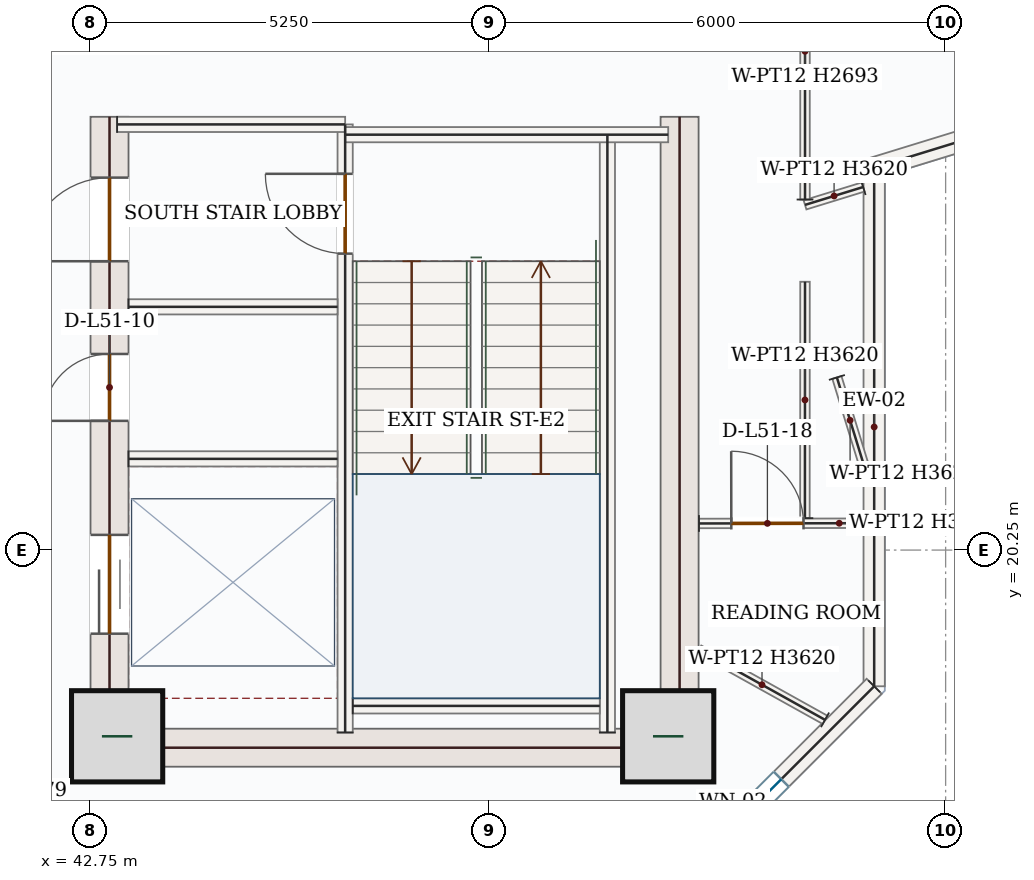
"""IFC4 building model, lengths in metres.
Left out: names, types, materials, properties, quantities, classifications, styles, units other than length and angle.
Written with IfcOpenShell. Run it as: python <this file> out.ifc"""

import sys

from ifc_helpers import new_model, si_unit, direction, frame, frame_2d, origin, origin_2d, place, context, subcontext, project, spatial, rectangle, extrude, source, transform, mapped, element, fill, save


model = new_model("IFC4")
c1 = context("Model", 3, precision=1e-05, world=origin(), true_north=direction((0.0, 1.0)))
c2 = subcontext(c1, "Body", "Model", "MODEL_VIEW")
j1 = project(units=[si_unit("LENGTHUNIT", "METRE"), si_unit("PLANEANGLEUNIT", "RADIAN")], contexts=[c1])
p1 = place(None, origin())
s1 = spatial("IfcSite", under=j1, at=p1, CompositionType="ELEMENT")
p2 = place(p1, origin())
s2 = spatial("IfcBuilding", under=s1, at=p2, CompositionType="ELEMENT")
p3 = place(p2, frame((0.0, 0.0, 217.5)))
s3 = spatial("IfcBuildingStorey", under=s2, at=p3, CompositionType="ELEMENT", Elevation=217.5)
p4 = place(p3, frame((43.0, 17.4, 0.0), z_axis=(0.0, 0.0, 1.0), x_axis=(0.0, 1.0, 0.0)))
e1 = element("IfcWall", 1, at=p4, inside=s3, PredefinedType="SHEAR", context=c2, shape_type="SweptSolid", body=[
    extrude(rectangle(XDim=8.55, YDim=0.5, at=frame_2d((4.275, 0.0))), origin(), (0.0, 0.0, 1.0), 3.62),
])
p5 = place(p4, frame((6.65, 0.0, 0.0)))
e2 = element("IfcOpeningElement", 2, at=p5, cuts=e1, PredefinedType="OPENING", context=c2, shape_type="SweptSolid", body=[
    extrude(rectangle(XDim=1.1, YDim=2.2, at=frame_2d((0.55, 1.1))), frame((0.0, 0.26, 0.0), z_axis=(0.0, -1.0, 0.0), x_axis=(1.0, 0.0, 0.0)), (0.0, 0.0, 1.0), 0.52),
])
p6 = place(p4, frame((1.75, 0.0, 0.0)))
e3 = element("IfcOpeningElement", 3, at=p6, cuts=e1, PredefinedType="OPENING", context=c2, shape_type="SweptSolid", body=[
    extrude(rectangle(XDim=1.3, YDim=2.2, at=frame_2d((0.65, 1.1))), frame((0.0, 0.26, 0.0), z_axis=(0.0, -1.0, 0.0), x_axis=(1.0, 0.0, 0.0)), (0.0, 0.0, 1.0), 0.52),
])
p7 = place(p4, frame((4.55, 0.0, 0.0)))
e4 = element("IfcOpeningElement", 4, at=p7, cuts=e1, PredefinedType="OPENING", context=c2, shape_type="SweptSolid", body=[
    extrude(rectangle(XDim=0.88, YDim=2.1, at=frame_2d((0.44, 1.05))), frame((0.0, 0.26, 0.0), z_axis=(0.0, -1.0, 0.0), x_axis=(1.0, 0.0, 0.0)), (0.0, 0.0, 1.0), 0.52),
])
m1 = source(origin(), c2, "Body", "SweptSolid", [
    extrude(rectangle(XDim=8.55, YDim=0.5, at=frame_2d((4.275, 0.0))), origin(), (0.0, 0.0, 1.0), 3.62),
])
p8 = place(p3, frame((50.5, 17.4, 0.0), z_axis=(0.0, 0.0, 1.0), x_axis=(0.0, 1.0, 0.0)))
e5 = element("IfcWall", 5, at=p8, inside=s3, PredefinedType="SHEAR", context=c2, shape_type="MappedRepresentation", body=[
    mapped(m1, transform((0.0, 0.0, 0.0), x_axis=(1.0, 0.0, 0.0), y_axis=(0.0, 1.0, 0.0), z_axis=(0.0, 0.0, 1.0), scale=1.0)),
])
m2 = source(origin(), c2, "Body", "SweptSolid", [
    extrude(rectangle(XDim=7.0, YDim=0.5, at=frame_2d((3.5, 0.0))), origin(), (0.0, 0.0, 1.0), 3.62),
])
p9 = place(p3, frame((43.25, 17.65, 0.0), z_axis=(0.0, 0.0, 1.0), x_axis=(1.0, 0.0, 0.0)))
e6 = element("IfcWall", 6, at=p9, inside=s3, PredefinedType="SHEAR", context=c2, shape_type="MappedRepresentation", body=[
    mapped(m2, transform((0.0, 0.0, 0.0), x_axis=(1.0, 0.0, 0.0), y_axis=(0.0, 1.0, 0.0), z_axis=(0.0, 0.0, 1.0), scale=1.0)),
])
m3 = source(origin(), c2, "Body", "SweptSolid", [
    extrude(rectangle(XDim=1.2, YDim=1.2, at=origin_2d()), origin(), (0.0, 0.0, 1.0), 3.9),
])
for number, where, z_axis, x_axis in (
    (7, (43.1, 17.8, 0.0), (0.0, 0.0, 1.0), (1.0, 0.0, 0.0)),
    (8, (50.35, 17.8, 0.0), (0.0, 0.0, 1.0), (1.0, 0.0, 0.0)),
):
    element("IfcColumn", number, at=place(p3, frame(where, z_axis=z_axis, x_axis=x_axis)), inside=s3, PredefinedType="COLUMN", context=c2, shape_type="MappedRepresentation", body=[
        mapped(m3, transform((0.0, 0.0, 0.0), x_axis=(1.0, 0.0, 0.0), y_axis=(0.0, 1.0, 0.0), z_axis=(0.0, 0.0, 1.0), scale=1.0)),
    ])
p10 = place(p3, frame((57.418, 26.621, 0.0), z_axis=(0.0, 0.0, 1.0), x_axis=(-0.955788269664, -0.294055749089, 0.0)))
e9 = element("IfcWall", 9, at=p10, inside=s3, PredefinedType="SOLIDWALL", context=c2, shape_type="SweptSolid", body=[
    extrude(rectangle(XDim=4.56, YDim=0.28, at=frame_2d((2.28, 0.0))), origin(), (0.0, 0.0, 1.0), 3.62),
])
p11 = place(p10, frame((1.38, 0.0, 0.85)))
e10 = element("IfcOpeningElement", 10, at=p11, cuts=e9, PredefinedType="OPENING", context=c2, shape_type="SweptSolid", body=[
    extrude(rectangle(XDim=1.8, YDim=1.75, at=frame_2d((0.9, 0.875))), frame((0.0, 0.15, 0.0), z_axis=(0.0, -1.0, 0.0), x_axis=(1.0, 0.0, 0.0)), (0.0, 0.0, 1.0), 0.3),
])
m4 = source(origin(), c2, "Body", "SweptSolid", [
    extrude(rectangle(XDim=6.822, YDim=0.28, at=frame_2d((3.411, 0.0))), origin(), (0.0, 0.0, 1.0), 3.62),
])
p12 = place(p3, frame((53.06, 25.28, 0.0), z_axis=(0.0, 0.0, 1.0), x_axis=(0.0, -1.0, 0.0)))
e11 = element("IfcWall", 11, at=p12, inside=s3, PredefinedType="SOLIDWALL", context=c2, shape_type="MappedRepresentation", body=[
    mapped(m4, transform((0.0, 0.0, 0.0), x_axis=(1.0, 0.0, 0.0), y_axis=(0.0, 1.0, 0.0), z_axis=(0.0, 0.0, 1.0), scale=1.0)),
])
p13 = place(p3, frame((53.06, 18.458, 0.0), z_axis=(0.0, 0.0, 1.0), x_axis=(-0.707106781187, -0.707106781187, 0.0)))
e12 = element("IfcWall", 12, at=p13, inside=s3, PredefinedType="SOLIDWALL", context=c2, shape_type="SweptSolid", body=[
    extrude(rectangle(XDim=5.258, YDim=0.28, at=frame_2d((2.629, 0.0))), origin(), (0.0, 0.0, 1.0), 3.62),
])
p14 = place(p13, frame((1.729, 0.0, 0.85)))
e13 = element("IfcOpeningElement", 13, at=p14, cuts=e12, PredefinedType="OPENING", context=c2, shape_type="SweptSolid", body=[
    extrude(rectangle(XDim=1.8, YDim=1.75, at=frame_2d((0.9, 0.875))), frame((0.0, 0.15, 0.0), z_axis=(0.0, -1.0, 0.0), x_axis=(1.0, 0.0, 0.0)), (0.0, 0.0, 1.0), 0.3),
])
m5 = source(origin(), c2, "Body", "SweptSolid", [
    extrude(rectangle(XDim=7.87, YDim=0.2, at=frame_2d((3.935, 0.0))), origin(), (0.0, 0.0, 1.0), 3.62),
])
p15 = place(p3, frame((49.55, 17.85, 0.0), z_axis=(0.0, 0.0, 1.0), x_axis=(0.0, 1.0, 0.0)))
e14 = element("IfcWall", 14, at=p15, inside=s3, PredefinedType="SOLIDWALL", context=c2, shape_type="MappedRepresentation", body=[
    mapped(m5, transform((0.0, 0.0, 0.0), x_axis=(1.0, 0.0, 0.0), y_axis=(0.0, 1.0, 0.0), z_axis=(0.0, 0.0, 1.0), scale=1.0)),
])
p16 = place(p3, frame((46.1, 17.85, 0.0), z_axis=(0.0, 0.0, 1.0), x_axis=(0.0, 1.0, 0.0)))
e15 = element("IfcWall", 15, at=p16, inside=s3, PredefinedType="SOLIDWALL", context=c2, shape_type="SweptSolid", body=[
    extrude(rectangle(XDim=8.0, YDim=0.2, at=frame_2d((4.0, 0.0))), origin(), (0.0, 0.0, 1.0), 3.62),
])
p17 = place(p16, frame((6.3, 0.0, 0.0)))
e16 = element("IfcOpeningElement", 16, at=p17, cuts=e15, PredefinedType="OPENING", context=c2, shape_type="SweptSolid", body=[
    extrude(rectangle(XDim=1.05, YDim=2.15, at=frame_2d((0.525, 1.075))), frame((0.0, 0.11, 0.0), z_axis=(0.0, -1.0, 0.0), x_axis=(1.0, 0.0, 0.0)), (0.0, 0.0, 1.0), 0.22),
])
m6 = source(origin(), c2, "Body", "SweptSolid", [
    extrude(rectangle(XDim=3.0, YDim=0.2, at=frame_2d((1.5, 0.0))), origin(), (0.0, 0.0, 1.0), 3.62),
])
p18 = place(p3, frame((43.1, 25.85, 0.0), z_axis=(0.0, 0.0, 1.0), x_axis=(1.0, 0.0, 0.0)))
e17 = element("IfcWall", 17, at=p18, inside=s3, PredefinedType="SOLIDWALL", context=c2, shape_type="MappedRepresentation", body=[
    mapped(m6, transform((0.0, 0.0, 0.0), x_axis=(1.0, 0.0, 0.0), y_axis=(0.0, 1.0, 0.0), z_axis=(0.0, 0.0, 1.0), scale=1.0)),
])
m7 = source(origin(), c2, "Body", "SweptSolid", [
    extrude(rectangle(XDim=4.25, YDim=0.2, at=frame_2d((2.125, 0.0))), origin(), (0.0, 0.0, 1.0), 3.62),
])
p19 = place(p3, frame((46.1, 25.715, 0.0), z_axis=(0.0, 0.0, 1.0), x_axis=(1.0, 0.0, 0.0)))
e18 = element("IfcWall", 18, at=p19, inside=s3, PredefinedType="SOLIDWALL", context=c2, shape_type="MappedRepresentation", body=[
    mapped(m7, transform((0.0, 0.0, 0.0), x_axis=(1.0, 0.0, 0.0), y_axis=(0.0, 1.0, 0.0), z_axis=(0.0, 0.0, 1.0), scale=1.0)),
])
m8 = source(origin(), c2, "Body", "SweptSolid", [
    extrude(rectangle(XDim=3.25, YDim=0.2, at=frame_2d((1.625, 0.0))), origin(), (0.0, 0.0, 1.0), 3.62),
])
p20 = place(p3, frame((46.2, 18.2, 0.0), z_axis=(0.0, 0.0, 1.0), x_axis=(1.0, 0.0, 0.0)))
e19 = element("IfcWall", 19, at=p20, inside=s3, PredefinedType="SOLIDWALL", context=c2, shape_type="MappedRepresentation", body=[
    mapped(m8, transform((0.0, 0.0, 0.0), x_axis=(1.0, 0.0, 0.0), y_axis=(0.0, 1.0, 0.0), z_axis=(0.0, 0.0, 1.0), scale=1.0)),
])
m9 = source(origin(), c2, "Body", "SweptSolid", [
    extrude(rectangle(XDim=2.75, YDim=0.2, at=frame_2d((1.375, 0.0))), origin(), (0.0, 0.0, 1.0), 3.62),
])
for number, where, z_axis, x_axis in (
    (20, (43.25, 23.45, 0.0), (0.0, 0.0, 1.0), (1.0, 0.0, 0.0)),
    (21, (43.25, 21.45, 0.0), (0.0, 0.0, 1.0), (1.0, 0.0, 0.0)),
):
    element("IfcWall", number, at=place(p3, frame(where, z_axis=z_axis, x_axis=x_axis)), inside=s3, PredefinedType="SOLIDWALL", context=c2, shape_type="MappedRepresentation", body=[
        mapped(m9, transform((0.0, 0.0, 0.0), x_axis=(1.0, 0.0, 0.0), y_axis=(0.0, 1.0, 0.0), z_axis=(0.0, 0.0, 1.0), scale=1.0)),
    ])
p21 = place(p3, frame((50.755, 20.6, 0.0), z_axis=(0.0, 0.0, 1.0), x_axis=(0.99999875384, 0.001578708001, 0.0)))
e22 = element("IfcWall", 22, at=p21, inside=s3, PredefinedType="PARTITIONING", context=c2, shape_type="SweptSolid", body=[
    extrude(rectangle(XDim=2.165, YDim=0.125, at=frame_2d((1.083, 0.0))), origin(), (0.0, 0.0, 1.0), 3.62),
])
p22 = place(p21, frame((0.425, 0.0, 0.0)))
e23 = element("IfcOpeningElement", 23, at=p22, cuts=e22, PredefinedType="OPENING", context=c2, shape_type="SweptSolid", body=[
    extrude(rectangle(XDim=0.95, YDim=2.15, at=frame_2d((0.475, 1.075))), frame((0.0, 0.073, 0.0), z_axis=(0.0, -1.0, 0.0), x_axis=(1.0, 0.0, 0.0)), (0.0, 0.0, 1.0), 0.145),
])
m10 = source(origin(), c2, "Body", "SweptSolid", [
    extrude(rectangle(XDim=3.11, YDim=0.125, at=frame_2d((1.555, 0.0))), origin(), (0.0, 0.0, 1.0), 3.62),
])
p23 = place(p3, frame((52.149, 20.67, 0.0), z_axis=(0.0, 0.0, 1.0), x_axis=(0.000392526269, 0.999999922962, 0.0)))
e24 = element("IfcWall", 24, at=p23, inside=s3, PredefinedType="PARTITIONING", context=c2, shape_type="MappedRepresentation", body=[
    mapped(m10, transform((0.0, 0.0, 0.0), x_axis=(1.0, 0.0, 0.0), y_axis=(0.0, 1.0, 0.0), z_axis=(0.0, 0.0, 1.0), scale=1.0)),
])
m11 = source(origin(), c2, "Body", "SweptSolid", [
    extrude(rectangle(XDim=1.18, YDim=0.125, at=frame_2d((0.59, 0.0))), origin(), (0.0, 0.0, 1.0), 3.62),
])
p24 = place(p3, frame((52.57, 22.521, 0.0), z_axis=(0.0, 0.0, 1.0), x_axis=(0.293984081944, -0.955810315682, 0.0)))
e25 = element("IfcWall", 25, at=p24, inside=s3, PredefinedType="PARTITIONING", context=c2, shape_type="MappedRepresentation", body=[
    mapped(m11, transform((0.0, 0.0, 0.0), x_axis=(1.0, 0.0, 0.0), y_axis=(0.0, 1.0, 0.0), z_axis=(0.0, 0.0, 1.0), scale=1.0)),
])
m12 = source(origin(), c2, "Body", "SweptSolid", [
    extrude(rectangle(XDim=1.898, YDim=0.125, at=frame_2d((0.949, 0.0))), origin(), (0.0, 0.0, 1.0), 3.62),
])
p25 = place(p3, frame((52.414, 18.017, 0.0), z_axis=(0.0, 0.0, 1.0), x_axis=(-0.873799105313, 0.486287079362, 0.0)))
e26 = element("IfcWall", 26, at=p25, inside=s3, PredefinedType="PARTITIONING", context=c2, shape_type="MappedRepresentation", body=[
    mapped(m12, transform((0.0, 0.0, 0.0), x_axis=(1.0, 0.0, 0.0), y_axis=(0.0, 1.0, 0.0), z_axis=(0.0, 0.0, 1.0), scale=1.0)),
])
m13 = source(origin(), c2, "Body", "SweptSolid", [
    extrude(rectangle(XDim=0.801, YDim=0.125, at=frame_2d((0.4, 0.0))), origin(), (0.0, 0.0, 1.0), 3.62),
])
p26 = place(p3, frame((52.915, 25.026, 0.0), z_axis=(0.0, 0.0, 1.0), x_axis=(-0.955805381473, -0.29400012372, 0.0)))
e27 = element("IfcWall", 27, at=p26, inside=s3, PredefinedType="PARTITIONING", context=c2, shape_type="MappedRepresentation", body=[
    mapped(m13, transform((0.0, 0.0, 0.0), x_axis=(1.0, 0.0, 0.0), y_axis=(0.0, 1.0, 0.0), z_axis=(0.0, 0.0, 1.0), scale=1.0)),
])
p27 = place(p3, frame((52.15, 24.862, 0.0), z_axis=(0.0, 0.0, 1.0), x_axis=(0.0, 1.0, 0.0)))
e28 = element("IfcWall", 28, at=p27, inside=s3, PredefinedType="PARTITIONING", context=c2, shape_type="SweptSolid", body=[
    extrude(rectangle(XDim=6.144, YDim=0.125, at=frame_2d((3.072, 0.0))), origin(), (0.0, 0.0, 1.0), 2.693),
])
p28 = place(p27, frame((4.052, 0.0, 0.0)))
e29 = element("IfcOpeningElement", 29, at=p28, cuts=e28, PredefinedType="OPENING", context=c2, shape_type="SweptSolid", body=[
    extrude(rectangle(XDim=0.95, YDim=2.15, at=frame_2d((0.475, 1.075))), frame((0.0, 0.073, 0.0), z_axis=(0.0, -1.0, 0.0), x_axis=(1.0, 0.0, 0.0)), (0.0, 0.0, 1.0), 0.145),
])
m14 = source(origin(), c2, "Body", "SweptSolid", [
    extrude(rectangle(XDim=1.8, YDim=1.75, at=frame_2d((0.9, 0.875))), frame((0.0, 0.03, 0.0), z_axis=(0.0, -1.0, 0.0), x_axis=(1.0, 0.0, 0.0)), (0.0, 0.0, 1.0), 0.06),
])
p29 = place(p14, origin())
e30 = element("IfcWindow", 30, at=p29, inside=s3, PartitioningType="DOUBLE_PANEL_VERTICAL", PredefinedType="WINDOW", context=c2, shape_type="MappedRepresentation", body=[
    mapped(m14, transform((0.0, 0.0, 0.0), x_axis=(1.0, 0.0, 0.0), y_axis=(0.0, 1.0, 0.0), z_axis=(0.0, 0.0, 1.0), scale=1.0)),
])
fill(e13, e30)
m15 = source(origin(), c2, "Body", "SweptSolid", [
    extrude(rectangle(XDim=1.05, YDim=2.15, at=frame_2d((0.525, 1.075))), frame((0.0, 0.025, 0.0), z_axis=(0.0, -1.0, 0.0), x_axis=(1.0, 0.0, 0.0)), (0.0, 0.0, 1.0), 0.05),
])
p30 = place(p17, origin())
e31 = element("IfcDoor", 31, at=p30, inside=s3, OperationType="SINGLE_SWING_RIGHT", PredefinedType="DOOR", context=c2, shape_type="MappedRepresentation", body=[
    mapped(m15, transform((0.0, 0.0, 0.0), x_axis=(1.0, 0.0, 0.0), y_axis=(0.0, 1.0, 0.0), z_axis=(0.0, 0.0, 1.0), scale=1.0)),
])
fill(e16, e31)
m16 = source(origin(), c2, "Body", "SweptSolid", [
    extrude(rectangle(XDim=1.1, YDim=2.2, at=frame_2d((0.55, 1.1))), frame((0.0, 0.025, 0.0), z_axis=(0.0, -1.0, 0.0), x_axis=(1.0, 0.0, 0.0)), (0.0, 0.0, 1.0), 0.05),
])
p31 = place(p5, origin())
e32 = element("IfcDoor", 32, at=p31, inside=s3, OperationType="SINGLE_SWING_LEFT", PredefinedType="DOOR", context=c2, shape_type="MappedRepresentation", body=[
    mapped(m16, transform((0.0, 0.0, 0.0), x_axis=(1.0, 0.0, 0.0), y_axis=(0.0, 1.0, 0.0), z_axis=(0.0, 0.0, 1.0), scale=1.0)),
])
fill(e2, e32)
m17 = source(origin(), c2, "Body", "SweptSolid", [
    extrude(rectangle(XDim=1.3, YDim=2.2, at=frame_2d((0.65, 1.1))), frame((0.0, 0.025, 0.0), z_axis=(0.0, -1.0, 0.0), x_axis=(1.0, 0.0, 0.0)), (0.0, 0.0, 1.0), 0.05),
])
p32 = place(p6, origin())
e33 = element("IfcDoor", 33, at=p32, inside=s3, OperationType="DOUBLE_DOOR_SLIDING", PredefinedType="DOOR", context=c2, shape_type="MappedRepresentation", body=[
    mapped(m17, transform((0.0, 0.0, 0.0), x_axis=(1.0, 0.0, 0.0), y_axis=(0.0, 1.0, 0.0), z_axis=(0.0, 0.0, 1.0), scale=1.0)),
])
fill(e3, e33)
m18 = source(origin(), c2, "Body", "SweptSolid", [
    extrude(rectangle(XDim=0.88, YDim=2.1, at=frame_2d((0.44, 1.05))), frame((0.0, 0.025, 0.0), z_axis=(0.0, -1.0, 0.0), x_axis=(1.0, 0.0, 0.0)), (0.0, 0.0, 1.0), 0.05),
])
p33 = place(p7, origin())
e34 = element("IfcDoor", 34, at=p33, inside=s3, OperationType="SINGLE_SWING_LEFT", PredefinedType="DOOR", context=c2, shape_type="MappedRepresentation", body=[
    mapped(m18, transform((0.0, 0.0, 0.0), x_axis=(1.0, 0.0, 0.0), y_axis=(0.0, 1.0, 0.0), z_axis=(0.0, 0.0, 1.0), scale=1.0)),
])
fill(e4, e34)
m19 = source(origin(), c2, "Body", "SweptSolid", [
    extrude(rectangle(XDim=0.95, YDim=2.15, at=frame_2d((0.475, 1.075))), frame((0.0, 0.025, 0.0), z_axis=(0.0, -1.0, 0.0), x_axis=(1.0, 0.0, 0.0)), (0.0, 0.0, 1.0), 0.05),
])
p34 = place(p22, origin())
e35 = element("IfcDoor", 35, at=p34, inside=s3, OperationType="SINGLE_SWING_LEFT", PredefinedType="DOOR", context=c2, shape_type="MappedRepresentation", body=[
    mapped(m19, transform((0.0, 0.0, 0.0), x_axis=(1.0, 0.0, 0.0), y_axis=(0.0, 1.0, 0.0), z_axis=(0.0, 0.0, 1.0), scale=1.0)),
])
fill(e23, e35)
save(model, sys.argv[1])
